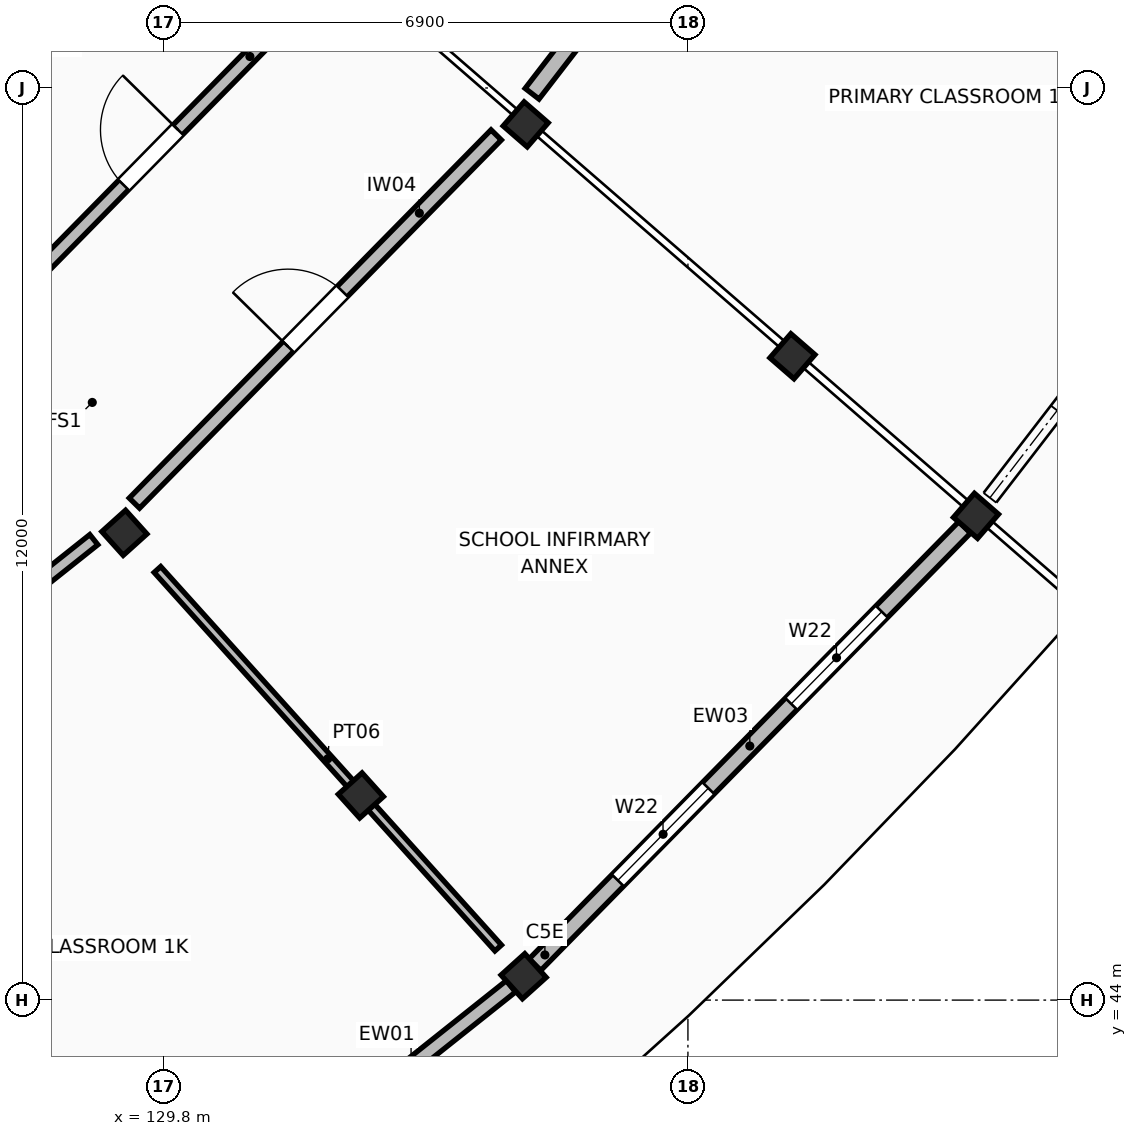
"""IFC4 building model, lengths in metres.
Left out: names, types, materials, properties, quantities, classifications, styles, units other than length and angle.
Written with IfcOpenShell. Run it as: python <this file> out.ifc"""

import sys

from ifc_helpers import new_model, si_unit, direction, frame, frame_2d, origin, origin_2d, place, context, subcontext, project, spatial, rectangle, extrude, element, fill, save


model = new_model("IFC4")
c1 = context("Model", 3, precision=1e-05, world=origin(), true_north=direction((0.0, 1.0)))
c2 = subcontext(c1, "Body", "Model", "MODEL_VIEW")
j1 = project(units=[si_unit("LENGTHUNIT", "METRE"), si_unit("PLANEANGLEUNIT", "RADIAN")], contexts=[c1])
p1 = place(None, origin())
s1 = spatial("IfcSite", under=j1, at=p1, CompositionType="ELEMENT")
p2 = place(p1, origin())
s2 = spatial("IfcBuilding", under=s1, at=p2, CompositionType="ELEMENT")
p3 = place(p2, origin())
s3 = spatial("IfcBuildingStorey", under=s2, at=p3, CompositionType="ELEMENT", Elevation=0.0)
for number, where, z_axis, x_axis in (
    (1, (129.285, 50.148, 0.0), (0.0, 0.0, 1.0), (0.669, -0.743, 0.0)),
    (2, (132.397, 46.692, 0.0), (0.0, 0.0, 1.0), (0.669, -0.743, 0.0)),
    (3, (134.538, 44.314, 0.0), (0.0, 0.0, 1.0), (0.669, -0.743, 0.0)),
    (4, (134.566, 55.521, 0.0), (0.0, 0.0, 1.0), (0.755, -0.656, 0.0)),
    (5, (138.075, 52.47, 0.0), (0.0, 0.0, 1.0), (0.755, -0.656, 0.0)),
    (6, (140.49, 50.371, 0.0), (0.0, 0.0, 1.0), (0.755, -0.656, 0.0)),
):
    element("IfcColumn", number, at=place(p3, frame(where, z_axis=z_axis, x_axis=x_axis)), inside=s3, PredefinedType="COLUMN", context=c2, shape_type="SweptSolid", body=[
        extrude(rectangle(XDim=0.42, YDim=0.42, at=origin_2d()), origin(), (0.0, 0.0, 1.0), 4.42),
    ])
p4 = place(p3, frame((128.059, 39.161, 0.0), z_axis=(0.0, 0.0, 1.0), x_axis=(0.782619821953, 0.622499971314, 0.0)))
e7 = element("IfcWall", 7, at=p4, inside=s3, PredefinedType="STANDARD", context=c2, shape_type="SweptSolid", body=[
    extrude(rectangle(XDim=8.066, YDim=0.192, at=frame_2d((4.033, 0.0))), origin(), (0.0, 0.0, 1.0), 3.4),
])
p5 = place(p4, frame((3.358, 0.0, 0.0)))
e8 = element("IfcOpeningElement", 8, at=p5, cuts=e7, PredefinedType="OPENING", context=c2, shape_type="SweptSolid", body=[
    extrude(rectangle(XDim=1.35, YDim=2.2, at=frame_2d((0.675, 1.1))), frame((0.0, 0.106, 0.0), z_axis=(0.0, -1.0, 0.0), x_axis=(1.0, 0.0, 0.0)), (0.0, 0.0, 1.0), 0.212),
])
p6 = place(p3, frame((134.687, 44.466, 0.0), z_axis=(0.0, 0.0, 1.0), x_axis=(0.700920376985, 0.713239528578, 0.0)))
e9 = element("IfcWall", 9, at=p6, inside=s3, PredefinedType="STANDARD", context=c2, shape_type="SweptSolid", body=[
    extrude(rectangle(XDim=8.066, YDim=0.216, at=frame_2d((4.033, 0.0))), origin(), (0.0, 0.0, 1.0), 3.4),
])
p7 = place(p6, frame((1.555, 0.0, 0.95)))
e10 = element("IfcOpeningElement", 10, at=p7, cuts=e9, PredefinedType="OPENING", context=c2, shape_type="SweptSolid", body=[
    extrude(rectangle(XDim=1.7, YDim=1.3, at=frame_2d((0.85, 0.65))), frame((0.0, 0.118, 0.0), z_axis=(0.0, -1.0, 0.0), x_axis=(1.0, 0.0, 0.0)), (0.0, 0.0, 1.0), 0.236),
])
p8 = place(p6, frame((4.811, 0.0, 0.95)))
e11 = element("IfcOpeningElement", 11, at=p8, cuts=e9, PredefinedType="OPENING", context=c2, shape_type="SweptSolid", body=[
    extrude(rectangle(XDim=1.7, YDim=1.3, at=frame_2d((0.85, 0.65))), frame((0.0, 0.118, 0.0), z_axis=(0.0, -1.0, 0.0), x_axis=(1.0, 0.0, 0.0)), (0.0, 0.0, 1.0), 0.236),
])
p9 = place(p3, frame((123.568, 45.83, 0.0), z_axis=(0.0, 0.0, 1.0), x_axis=(0.782615780998, 0.622505051653, 0.0)))
e12 = element("IfcWall", 12, at=p9, inside=s3, PredefinedType="STANDARD", context=c2, shape_type="SweptSolid", body=[
    extrude(rectangle(XDim=6.792, YDim=0.17, at=frame_2d((3.396, 0.0))), origin(), (0.0, 0.0, 1.0), 3.38),
])
p10 = place(p9, frame((2.886, 0.0, 0.0)))
e13 = element("IfcOpeningElement", 13, at=p10, cuts=e12, PredefinedType="OPENING", context=c2, shape_type="SweptSolid", body=[
    extrude(rectangle(XDim=1.02, YDim=2.06, at=frame_2d((0.51, 1.03))), frame((0.0, 0.095, 0.0), z_axis=(0.0, -1.0, 0.0), x_axis=(1.0, 0.0, 0.0)), (0.0, 0.0, 1.0), 0.19),
])
p11 = place(p3, frame((127.383, 52.798, 0.0), z_axis=(0.0, 0.0, 1.0), x_axis=(0.700900509406, 0.713259052459, 0.0)))
e14 = element("IfcWall", 14, at=p11, inside=s3, PredefinedType="STANDARD", context=c2, shape_type="SweptSolid", body=[
    extrude(rectangle(XDim=6.42, YDim=0.18, at=frame_2d((3.21, 0.0))), origin(), (0.0, 0.0, 1.0), 3.38),
])
p12 = place(p11, frame((2.7, 0.0, 0.0)))
e15 = element("IfcOpeningElement", 15, at=p12, cuts=e14, PredefinedType="OPENING", context=c2, shape_type="SweptSolid", body=[
    extrude(rectangle(XDim=1.02, YDim=2.12, at=frame_2d((0.51, 1.06))), frame((0.0, 0.1, 0.0), z_axis=(0.0, -1.0, 0.0), x_axis=(1.0, 0.0, 0.0)), (0.0, 0.0, 1.0), 0.2),
])
p13 = place(p3, frame((129.417, 50.539, 0.0), z_axis=(0.0, 0.0, 1.0), x_axis=(0.700914816473, 0.713244993006, 0.0)))
e16 = element("IfcWall", 16, at=p13, inside=s3, PredefinedType="STANDARD", context=c2, shape_type="SweptSolid", body=[
    extrude(rectangle(XDim=6.792, YDim=0.19, at=frame_2d((3.396, 0.0))), origin(), (0.0, 0.0, 1.0), 3.38),
])
p14 = place(p13, frame((2.886, 0.0, 0.0)))
e17 = element("IfcOpeningElement", 17, at=p14, cuts=e16, PredefinedType="OPENING", context=c2, shape_type="SweptSolid", body=[
    extrude(rectangle(XDim=1.02, YDim=2.18, at=frame_2d((0.51, 1.09))), frame((0.0, 0.105, 0.0), z_axis=(0.0, -1.0, 0.0), x_axis=(1.0, 0.0, 0.0)), (0.0, 0.0, 1.0), 0.21),
])
p15 = place(p3, frame((129.72, 49.665, 0.0), z_axis=(0.0, 0.0, 1.0), x_axis=(0.669115705072, -0.743158242386, 0.0)))
e18 = element("IfcWall", 18, at=p15, inside=s3, PredefinedType="PARTITIONING", context=c2, shape_type="SweptSolid", body=[
    extrude(rectangle(XDim=6.7, YDim=0.116, at=frame_2d((3.35, 0.0))), origin(), (0.0, 0.0, 1.0), 3.38),
])
p16 = place(p3, frame((134.649, 55.924, 0.0), z_axis=(0.0, 0.0, 1.0), x_axis=(0.610378079511, 0.792110219637, 0.0)))
e19 = element("IfcWall", 19, at=p16, inside=s3, PredefinedType="STANDARD", context=c2, shape_type="SweptSolid", body=[
    extrude(rectangle(XDim=6.54, YDim=0.23, at=frame_2d((3.27, 0.0))), origin(), (0.0, 0.0, 1.0), 3.38),
])
p17 = place(p16, frame((2.84, 0.0, 0.0)))
e20 = element("IfcOpeningElement", 20, at=p17, cuts=e19, PredefinedType="OPENING", context=c2, shape_type="SweptSolid", body=[
    extrude(rectangle(XDim=0.86, YDim=2.06, at=frame_2d((0.43, 1.03))), frame((0.0, 0.125, 0.0), z_axis=(0.0, -1.0, 0.0), x_axis=(1.0, 0.0, 0.0)), (0.0, 0.0, 1.0), 0.25),
])
p18 = place(p7, origin())
e21 = element("IfcWindow", 21, at=p18, inside=s3, PartitioningType="SINGLE_PANEL", PredefinedType="WINDOW", context=c2, shape_type="SweptSolid", body=[
    extrude(rectangle(XDim=1.7, YDim=1.3, at=frame_2d((0.85, 0.65))), frame((0.0, 0.03, 0.0), z_axis=(0.0, -1.0, 0.0), x_axis=(1.0, 0.0, 0.0)), (0.0, 0.0, 1.0), 0.06),
])
fill(e10, e21)
p19 = place(p8, origin())
e22 = element("IfcWindow", 22, at=p19, inside=s3, PartitioningType="SINGLE_PANEL", PredefinedType="WINDOW", context=c2, shape_type="SweptSolid", body=[
    extrude(rectangle(XDim=1.7, YDim=1.3, at=frame_2d((0.85, 0.65))), frame((0.0, 0.03, 0.0), z_axis=(0.0, -1.0, 0.0), x_axis=(1.0, 0.0, 0.0)), (0.0, 0.0, 1.0), 0.06),
])
fill(e11, e22)
p20 = place(p12, frame((1.02, 0.0, 0.0), z_axis=(0.0, 0.0, 1.0), x_axis=(-1.0, 0.0, 0.0)))
e23 = element("IfcDoor", 23, at=p20, inside=s3, OperationType="SINGLE_SWING_RIGHT", PredefinedType="DOOR", context=c2, shape_type="SweptSolid", body=[
    extrude(rectangle(XDim=1.02, YDim=2.12, at=frame_2d((0.51, 1.06))), frame((0.0, 0.025, 0.0), z_axis=(0.0, -1.0, 0.0), x_axis=(1.0, 0.0, 0.0)), (0.0, 0.0, 1.0), 0.05),
])
fill(e15, e23)
p21 = place(p14, origin())
e24 = element("IfcDoor", 24, at=p21, inside=s3, OperationType="SINGLE_SWING_LEFT", PredefinedType="DOOR", context=c2, shape_type="SweptSolid", body=[
    extrude(rectangle(XDim=1.02, YDim=2.18, at=frame_2d((0.51, 1.09))), frame((0.0, 0.025, 0.0), z_axis=(0.0, -1.0, 0.0), x_axis=(1.0, 0.0, 0.0)), (0.0, 0.0, 1.0), 0.05),
])
fill(e17, e24)
save(model, sys.argv[1])
